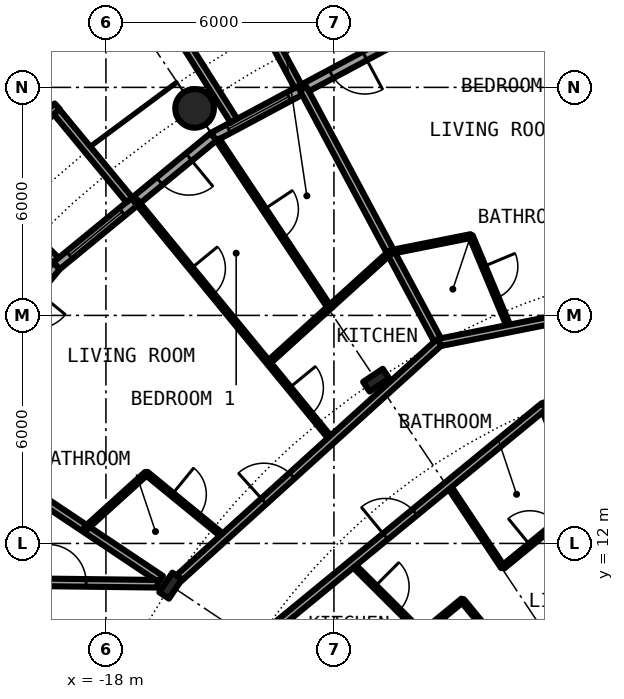
"""IFC4 building model, lengths in metres.
Left out: names, types, materials, properties, quantities, classifications, styles, units other than length and angle.
Written with IfcOpenShell. Run it as: python <this file> out.ifc"""

import sys

from ifc_helpers import new_model, si_unit, direction, frame, frame_2d, origin, origin_2d, place, context, subcontext, project, spatial, rectangle, circle, hollow_circle, i_section, extrude, element, fill, save


model = new_model("IFC4")
c1 = context("Model", 3, precision=1e-05, world=origin(), true_north=direction((0.0, 1.0)))
c2 = subcontext(c1, "Body", "Model", "MODEL_VIEW")
j1 = project(units=[si_unit("LENGTHUNIT", "METRE"), si_unit("PLANEANGLEUNIT", "RADIAN")], contexts=[c1])
p1 = place(None, origin())
s1 = spatial("IfcSite", under=j1, at=p1, CompositionType="ELEMENT")
p2 = place(p1, origin())
s2 = spatial("IfcBuilding", under=s1, at=p2, CompositionType="ELEMENT")
p3 = place(p2, frame((0.0, 0.0, 35.0)))
s3 = spatial("IfcBuildingStorey", under=s2, at=p3, CompositionType="ELEMENT", Elevation=35.0)
p4 = place(p3, frame((-15.667, 23.448, 0.0), z_axis=(0.0, 0.0, 1.0), x_axis=(1.0, 0.0, 0.0)))
e1 = element("IfcColumn", 1, at=p4, inside=s3, PredefinedType="COLUMN", context=c2, shape_type="SweptSolid", body=[
    extrude(hollow_circle(Radius=0.508, WallThickness=0.05, at=origin_2d()), origin(), (0.0, 0.0, 1.0), 3.05),
])
for number, where, z_axis, x_axis in (
    (2, (-10.889, 16.297, 0.0), (0.0, 0.0, 1.0), (-0.556, 0.831, 0.0)),
    (3, (-16.297, 10.889, 0.0), (0.0, 0.0, 1.0), (-0.831, 0.556, 0.0)),
):
    element("IfcColumn", number, at=place(p3, frame(where, z_axis=z_axis, x_axis=x_axis)), inside=s3, PredefinedType="COLUMN", context=c2, shape_type="SweptSolid", body=[
        extrude(i_section(OverallWidth=0.305, OverallDepth=0.62, WebThickness=0.021, FlangeThickness=0.04, FilletRadius=0.027, at=origin_2d()), origin(), (0.0, 0.0, 1.0), 3.05),
    ])
p5 = place(p3, frame((-10.447, 25.222, 0.0), z_axis=(0.0, 0.0, 1.0), x_axis=(-0.881915646801, -0.471407246368, 0.0)))
e4 = element("IfcWall", 4, at=p5, inside=s3, PredefinedType="SOLIDWALL", context=c2, shape_type="SweptSolid", body=[
    extrude(rectangle(XDim=5.352, YDim=0.25, at=frame_2d((2.676, 0.0))), origin(), (0.0, 0.0, 1.0), 2.7),
])
p6 = place(p5, frame((0.841, 0.0, 0.0)))
e5 = element("IfcOpeningElement", 5, at=p6, cuts=e4, PredefinedType="OPENING", context=c2, shape_type="SweptSolid", body=[
    extrude(rectangle(XDim=1.0, YDim=2.2, at=frame_2d((0.5, 1.1))), frame((0.0, 0.135, 0.0), z_axis=(0.0, -1.0, 0.0), x_axis=(1.0, 0.0, 0.0)), (0.0, 0.0, 1.0), 0.27),
])
p7 = place(p5, frame((3.111, 0.0, 0.3)))
e6 = element("IfcOpeningElement", 6, at=p7, cuts=e4, PredefinedType="OPENING", context=c2, shape_type="SweptSolid", body=[
    extrude(rectangle(XDim=1.8, YDim=2.1, at=frame_2d((0.9, 1.05))), frame((0.0, 0.135, 0.0), z_axis=(0.0, -1.0, 0.0), x_axis=(1.0, 0.0, 0.0)), (0.0, 0.0, 1.0), 0.27),
])
p8 = place(p3, frame((-12.945, 24.029, -0.03), z_axis=(0.0, 0.0, 1.0), x_axis=(-0.474424310775, 0.88029629861, 0.0)))
e7 = element("IfcWall", 7, at=p8, inside=s3, PredefinedType="SOLIDWALL", context=c2, shape_type="SweptSolid", body=[
    extrude(rectangle(XDim=3.006, YDim=0.2, at=frame_2d((1.503, 0.0))), origin(), (0.0, 0.0, 1.0), 2.73),
])
p9 = place(p3, frame((-14.635, 23.126, -0.03), z_axis=(0.0, 0.0, 1.0), x_axis=(-0.534437802731, 0.845207805816, 0.0)))
e8 = element("IfcWall", 8, at=p9, inside=s3, PredefinedType="SOLIDWALL", context=c2, shape_type="SweptSolid", body=[
    extrude(rectangle(XDim=2.932, YDim=0.2, at=frame_2d((1.466, 0.0))), origin(), (0.0, 0.0, 1.0), 2.73),
])
p10 = place(p3, frame((-15.167, 22.699, 0.0), z_axis=(0.0, 0.0, 1.0), x_axis=(-0.773019449054, -0.634382322723, 0.0)))
e9 = element("IfcWall", 9, at=p10, inside=s3, PredefinedType="SOLIDWALL", context=c2, shape_type="SweptSolid", body=[
    extrude(rectangle(XDim=5.352, YDim=0.25, at=frame_2d((2.676, 0.0))), origin(), (0.0, 0.0, 1.0), 2.7),
])
p11 = place(p10, frame((0.841, 0.0, 0.0)))
e10 = element("IfcOpeningElement", 10, at=p11, cuts=e9, PredefinedType="OPENING", context=c2, shape_type="SweptSolid", body=[
    extrude(rectangle(XDim=1.0, YDim=2.2, at=frame_2d((0.5, 1.1))), frame((0.0, 0.135, 0.0), z_axis=(0.0, -1.0, 0.0), x_axis=(1.0, 0.0, 0.0)), (0.0, 0.0, 1.0), 0.27),
])
p12 = place(p10, frame((3.111, 0.0, 0.3)))
e11 = element("IfcOpeningElement", 11, at=p12, cuts=e9, PredefinedType="OPENING", context=c2, shape_type="SweptSolid", body=[
    extrude(rectangle(XDim=1.8, YDim=2.1, at=frame_2d((0.9, 1.05))), frame((0.0, 0.135, 0.0), z_axis=(0.0, -1.0, 0.0), x_axis=(1.0, 0.0, 0.0)), (0.0, 0.0, 1.0), 0.27),
])
p13 = place(p3, frame((-19.282, 23.503, -0.03), z_axis=(0.0, 0.0, 1.0), x_axis=(-0.740998365753, -0.671506829416, 0.0)))
e12 = element("IfcWall", 12, at=p13, inside=s3, PredefinedType="SOLIDWALL", context=c2, shape_type="SweptSolid", body=[
    extrude(rectangle(XDim=2.993, YDim=0.2, at=frame_2d((1.497, 0.0))), origin(), (0.0, 0.0, 1.0), 2.73),
])
p14 = place(p13, frame((0.457, 0.0, 0.33)))
e13 = element("IfcOpeningElement", 13, at=p14, cuts=e12, PredefinedType="OPENING", context=c2, shape_type="SweptSolid", body=[
    extrude(circle(Radius=1.04, at=frame_2d((1.04, 1.04))), frame((0.0, 0.11, 0.0), z_axis=(0.0, -1.0, 0.0), x_axis=(1.0, 0.0, 0.0)), (0.0, 0.0, 1.0), 0.22),
])
p15 = place(p3, frame((-17.384, 21.041, -0.03), z_axis=(0.0, 0.0, 1.0), x_axis=(-0.63709551667, 0.770784861449, 0.0)))
e14 = element("IfcWall", 14, at=p15, inside=s3, PredefinedType="SOLIDWALL", context=c2, shape_type="SweptSolid", body=[
    extrude(rectangle(XDim=3.006, YDim=0.2, at=frame_2d((1.503, 0.0))), origin(), (0.0, 0.0, 1.0), 2.73),
])
p16 = place(p3, frame((-19.323, 19.45, -0.03), z_axis=(0.0, 0.0, 1.0), x_axis=(-0.704476739375, 0.709727076896, 0.0)))
e15 = element("IfcWall", 15, at=p16, inside=s3, PredefinedType="SOLIDWALL", context=c2, shape_type="SweptSolid", body=[
    extrude(rectangle(XDim=2.883, YDim=0.2, at=frame_2d((1.441, 0.0))), origin(), (0.0, 0.0, 1.0), 2.73),
])
p17 = place(p3, frame((-19.304, 19.304, 0.0), z_axis=(0.0, 0.0, 1.0), x_axis=(-0.634382322723, -0.773019449054, 0.0)))
e16 = element("IfcWall", 16, at=p17, inside=s3, PredefinedType="SOLIDWALL", context=c2, shape_type="SweptSolid", body=[
    extrude(rectangle(XDim=5.352, YDim=0.25, at=frame_2d((2.676, 0.0))), origin(), (0.0, 0.0, 1.0), 2.7),
])
p18 = place(p17, frame((0.841, 0.0, 0.0)))
e17 = element("IfcOpeningElement", 17, at=p18, cuts=e16, PredefinedType="OPENING", context=c2, shape_type="SweptSolid", body=[
    extrude(rectangle(XDim=1.0, YDim=2.2, at=frame_2d((0.5, 1.1))), frame((0.0, 0.135, 0.0), z_axis=(0.0, -1.0, 0.0), x_axis=(1.0, 0.0, 0.0)), (0.0, 0.0, 1.0), 0.27),
])
p19 = place(p17, frame((3.111, 0.0, 0.3)))
e18 = element("IfcOpeningElement", 18, at=p19, cuts=e16, PredefinedType="OPENING", context=c2, shape_type="SweptSolid", body=[
    extrude(rectangle(XDim=1.8, YDim=2.1, at=frame_2d((0.9, 1.05))), frame((0.0, 0.135, 0.0), z_axis=(0.0, -1.0, 0.0), x_axis=(1.0, 0.0, 0.0)), (0.0, 0.0, 1.0), 0.27),
])
p20 = place(p3, frame((-22.595, 15.098, 0.0), z_axis=(0.0, 0.0, 1.0), x_axis=(0.831403467378, -0.55566921314, 0.0)))
e19 = element("IfcWall", 19, at=p20, inside=s3, PredefinedType="PARTITIONING", context=c2, shape_type="SweptSolid", body=[
    extrude(rectangle(XDim=7.265, YDim=0.2, at=frame_2d((3.632, 0.0))), origin(), (0.0, 0.0, 1.0), 2.7),
])
p21 = place(p3, frame((-17.219, 21.023, 0.0), z_axis=(0.0, 0.0, 1.0), x_axis=(0.633664062855, -0.773608334654, 0.0)))
e20 = element("IfcWall", 20, at=p21, inside=s3, PredefinedType="PARTITIONING", context=c2, shape_type="SweptSolid", body=[
    extrude(rectangle(XDim=8.138, YDim=0.1, at=frame_2d((4.069, 0.0))), origin(), (0.0, 0.0, 1.0), 2.7),
])
p22 = place(p21, frame((6.377, 0.0, 0.0)))
e21 = element("IfcOpeningElement", 21, at=p22, cuts=e20, PredefinedType="OPENING", context=c2, shape_type="SweptSolid", body=[
    extrude(rectangle(XDim=0.9, YDim=2.3, at=frame_2d((0.45, 1.15))), frame((0.0, 0.06, 0.0), z_axis=(0.0, -1.0, 0.0), x_axis=(1.0, 0.0, 0.0)), (0.0, 0.0, 1.0), 0.12),
])
p23 = place(p21, frame((2.308, 0.0, 0.0)))
e22 = element("IfcOpeningElement", 22, at=p23, cuts=e20, PredefinedType="OPENING", context=c2, shape_type="SweptSolid", body=[
    extrude(rectangle(XDim=0.9, YDim=2.3, at=frame_2d((0.45, 1.15))), frame((0.0, 0.06, 0.0), z_axis=(0.0, -1.0, 0.0), x_axis=(1.0, 0.0, 0.0)), (0.0, 0.0, 1.0), 0.12),
])
p24 = place(p3, frame((-16.936, 13.845, 0.0), z_axis=(0.0, 0.0, 1.0), x_axis=(0.774162545943, -0.632986850147, 0.0)))
e23 = element("IfcWall", 23, at=p24, inside=s3, PredefinedType="PARTITIONING", context=c2, shape_type="SweptSolid", body=[
    extrude(rectangle(XDim=2.649, YDim=0.1, at=frame_2d((1.325, 0.0))), origin(), (0.0, 0.0, 1.0), 2.7),
])
p25 = place(p24, frame((0.875, 0.0, 0.0)))
e24 = element("IfcOpeningElement", 24, at=p25, cuts=e23, PredefinedType="OPENING", context=c2, shape_type="SweptSolid", body=[
    extrude(rectangle(XDim=0.9, YDim=2.3, at=frame_2d((0.45, 1.15))), frame((0.0, 0.06, 0.0), z_axis=(0.0, -1.0, 0.0), x_axis=(1.0, 0.0, 0.0)), (0.0, 0.0, 1.0), 0.12),
])
p26 = place(p3, frame((-15.054, 22.624, 0.0), z_axis=(0.0, 0.0, 1.0), x_axis=(0.553913391217, -0.832574294, 0.0)))
e25 = element("IfcWall", 25, at=p26, inside=s3, PredefinedType="PARTITIONING", context=c2, shape_type="SweptSolid", body=[
    extrude(rectangle(XDim=5.301, YDim=0.1, at=frame_2d((2.65, 0.0))), origin(), (0.0, 0.0, 1.0), 2.7),
])
p27 = place(p26, frame((2.2, 0.0, 0.0)))
e26 = element("IfcOpeningElement", 26, at=p27, cuts=e25, PredefinedType="OPENING", context=c2, shape_type="SweptSolid", body=[
    extrude(rectangle(XDim=0.9, YDim=2.3, at=frame_2d((0.45, 1.15))), frame((0.0, 0.06, 0.0), z_axis=(0.0, -1.0, 0.0), x_axis=(1.0, 0.0, 0.0)), (0.0, 0.0, 1.0), 0.12),
])
p28 = place(p3, frame((-12.81, 23.966, 0.0), z_axis=(0.0, 0.0, 1.0), x_axis=(0.471439510802, -0.881898399848, 0.0)))
e27 = element("IfcWall", 27, at=p28, inside=s3, PredefinedType="PARTITIONING", context=c2, shape_type="SweptSolid", body=[
    extrude(rectangle(XDim=7.575, YDim=0.2, at=frame_2d((3.787, 0.0))), origin(), (0.0, 0.0, 1.0), 2.7),
])
p29 = place(p3, frame((-11.524, 11.464, 0.0), z_axis=(0.0, 0.0, 1.0), x_axis=(0.708796844581, -0.705412668665, 0.0)))
e28 = element("IfcWall", 28, at=p29, inside=s3, PredefinedType="PARTITIONING", context=c2, shape_type="SweptSolid", body=[
    extrude(rectangle(XDim=2.597, YDim=0.1, at=frame_2d((1.299, 0.0))), origin(), (0.0, 0.0, 1.0), 2.7),
])
p30 = place(p29, frame((0.849, 0.0, 0.0)))
e29 = element("IfcOpeningElement", 29, at=p30, cuts=e28, PredefinedType="OPENING", context=c2, shape_type="SweptSolid", body=[
    extrude(rectangle(XDim=0.9, YDim=2.3, at=frame_2d((0.45, 1.15))), frame((0.0, 0.06, 0.0), z_axis=(0.0, -1.0, 0.0), x_axis=(1.0, 0.0, 0.0)), (0.0, 0.0, 1.0), 0.12),
])
p31 = place(p3, frame((-8.996, 13.539, 0.0), z_axis=(0.0, 0.0, 1.0), x_axis=(0.553615197403, -0.83277260594, 0.0)))
e30 = element("IfcWall", 30, at=p31, inside=s3, PredefinedType="PARTITIONING", context=c2, shape_type="SweptSolid", body=[
    extrude(rectangle(XDim=2.597, YDim=0.1, at=frame_2d((1.299, 0.0))), origin(), (0.0, 0.0, 1.0), 2.7),
])
p32 = place(p3, frame((-8.621, 10.503, 0.0), z_axis=(0.0, 0.0, 1.0), x_axis=(0.634358693064, -0.773038840249, 0.0)))
e31 = element("IfcWall", 31, at=p32, inside=s3, PredefinedType="PARTITIONING", context=c2, shape_type="SweptSolid", body=[
    extrude(rectangle(XDim=5.868, YDim=0.1, at=frame_2d((2.934, 0.0))), origin(), (0.0, 0.0, 1.0), 2.7),
])
p33 = place(p32, frame((2.484, 0.0, 0.0)))
e32 = element("IfcOpeningElement", 32, at=p33, cuts=e31, PredefinedType="OPENING", context=c2, shape_type="SweptSolid", body=[
    extrude(rectangle(XDim=0.9, YDim=2.3, at=frame_2d((0.45, 1.15))), frame((0.0, 0.06, 0.0), z_axis=(0.0, -1.0, 0.0), x_axis=(1.0, 0.0, 0.0)), (0.0, 0.0, 1.0), 0.12),
])
p34 = place(p3, frame((-8.396, 20.088, 0.0), z_axis=(0.0, 0.0, 1.0), x_axis=(0.385844829344, -0.922563693014, 0.0)))
e33 = element("IfcWall", 33, at=p34, inside=s3, PredefinedType="PARTITIONING", context=c2, shape_type="SweptSolid", body=[
    extrude(rectangle(XDim=2.636, YDim=0.1, at=frame_2d((1.318, 0.0))), origin(), (0.0, 0.0, 1.0), 2.7),
])
p35 = place(p34, frame((0.868, 0.0, 0.0)))
e34 = element("IfcOpeningElement", 34, at=p35, cuts=e33, PredefinedType="OPENING", context=c2, shape_type="SweptSolid", body=[
    extrude(rectangle(XDim=0.9, YDim=2.3, at=frame_2d((0.45, 1.15))), frame((0.0, 0.06, 0.0), z_axis=(0.0, -1.0, 0.0), x_axis=(1.0, 0.0, 0.0)), (0.0, 0.0, 1.0), 0.12),
])
p36 = place(p3, frame((-6.467, 15.614, 0.0), z_axis=(0.0, 0.0, 1.0), x_axis=(0.382556139466, -0.923932248683, 0.0)))
e35 = element("IfcWall", 35, at=p36, inside=s3, PredefinedType="PARTITIONING", context=c2, shape_type="SweptSolid", body=[
    extrude(rectangle(XDim=9.18, YDim=0.2, at=frame_2d((4.59, 0.0))), origin(), (0.0, 0.0, 1.0), 2.7),
])
p37 = place(p3, frame((-21.675, 11.0, 0.0), z_axis=(0.0, 0.0, 1.0), x_axis=(0.999926652916, -0.012111514691, 0.0)))
e36 = element("IfcWall", 36, at=p37, inside=s3, PredefinedType="PARTITIONING", context=c2, shape_type="SweptSolid", body=[
    extrude(rectangle(XDim=5.04, YDim=0.2, at=frame_2d((2.52, 0.0))), origin(), (0.0, 0.0, 1.0), 2.7),
])
p38 = place(p37, frame((2.154, 0.0, 0.0)))
e37 = element("IfcOpeningElement", 37, at=p38, cuts=e36, PredefinedType="OPENING", context=c2, shape_type="SweptSolid", body=[
    extrude(rectangle(XDim=1.0, YDim=2.3, at=frame_2d((0.5, 1.15))), frame((0.0, 0.11, 0.0), z_axis=(0.0, -1.0, 0.0), x_axis=(1.0, 0.0, 0.0)), (0.0, 0.0, 1.0), 0.22),
])
p39 = place(p3, frame((-9.965, 9.4, 0.0), z_axis=(0.0, 0.0, 1.0), x_axis=(0.773141825369, 0.634233173104, 0.0)))
e38 = element("IfcWall", 38, at=p39, inside=s3, PredefinedType="PARTITIONING", context=c2, shape_type="SweptSolid", body=[
    extrude(rectangle(XDim=1.749, YDim=0.1, at=frame_2d((0.875, 0.0))), origin(), (0.0, 0.0, 1.0), 2.7),
])
p40 = place(p3, frame((-7.552, 11.379, 0.0), z_axis=(0.0, 0.0, 1.0), x_axis=(0.773323547924, 0.634011585246, 0.0)))
e39 = element("IfcWall", 39, at=p40, inside=s3, PredefinedType="PARTITIONING", context=c2, shape_type="SweptSolid", body=[
    extrude(rectangle(XDim=2.748, YDim=0.1, at=frame_2d((1.374, 0.0))), origin(), (0.0, 0.0, 1.0), 2.7),
])
p41 = place(p40, frame((0.917, 0.0, 0.0)))
e40 = element("IfcOpeningElement", 40, at=p41, cuts=e39, PredefinedType="OPENING", context=c2, shape_type="SweptSolid", body=[
    extrude(rectangle(XDim=0.9, YDim=2.3, at=frame_2d((0.45, 1.15))), frame((0.0, 0.06, 0.0), z_axis=(0.0, -1.0, 0.0), x_axis=(1.0, 0.0, 0.0)), (0.0, 0.0, 1.0), 0.12),
])
p42 = place(p3, frame((-14.039, 9.4, 0.0), z_axis=(0.0, 0.0, 1.0), x_axis=(0.77298340166, 0.634426245326, 0.0)))
e41 = element("IfcWall", 41, at=p42, inside=s3, PredefinedType="PARTITIONING", context=c2, shape_type="SweptSolid", body=[
    extrude(rectangle(XDim=9.793, YDim=0.2, at=frame_2d((4.896, 0.0))), origin(), (0.0, 0.0, 1.0), 2.7),
])
p43 = place(p42, frame((4.389, 0.0, 0.0)))
e42 = element("IfcOpeningElement", 42, at=p43, cuts=e41, PredefinedType="OPENING", context=c2, shape_type="SweptSolid", body=[
    extrude(rectangle(XDim=1.0, YDim=2.3, at=frame_2d((0.5, 1.15))), frame((0.0, 0.11, 0.0), z_axis=(0.0, -1.0, 0.0), x_axis=(1.0, 0.0, 0.0)), (0.0, 0.0, 1.0), 0.22),
])
p44 = place(p3, frame((-9.239, 17.286, 0.0), z_axis=(0.0, 0.0, 1.0), x_axis=(0.98077905287, 0.195121627328, 0.0)))
e43 = element("IfcWall", 43, at=p44, inside=s3, PredefinedType="PARTITIONING", context=c2, shape_type="SweptSolid", body=[
    extrude(rectangle(XDim=11.379, YDim=0.2, at=frame_2d((5.689, 0.0))), origin(), (0.0, 0.0, 1.0), 2.38),
])
p45 = place(p44, frame((3.293, 0.0, 0.0)))
e44 = element("IfcOpeningElement", 44, at=p45, cuts=e43, PredefinedType="OPENING", context=c2, shape_type="SweptSolid", body=[
    extrude(rectangle(XDim=1.0, YDim=2.3, at=frame_2d((0.5, 1.15))), frame((0.0, 0.11, 0.0), z_axis=(0.0, -1.0, 0.0), x_axis=(1.0, 0.0, 0.0)), (0.0, 0.0, 1.0), 0.22),
])
p46 = place(p3, frame((-16.18, 10.995, 0.0), z_axis=(0.0, 0.0, 1.0), x_axis=(0.74112906966, 0.671362571272, 0.0)))
e45 = element("IfcWall", 45, at=p46, inside=s3, PredefinedType="PARTITIONING", context=c2, shape_type="SweptSolid", body=[
    extrude(rectangle(XDim=9.375, YDim=0.2, at=frame_2d((4.688, 0.0))), origin(), (0.0, 0.0, 1.0), 2.38),
])
p47 = place(p46, frame((3.152, 0.0, 0.0)))
e46 = element("IfcOpeningElement", 46, at=p47, cuts=e45, PredefinedType="OPENING", context=c2, shape_type="SweptSolid", body=[
    extrude(rectangle(XDim=1.0, YDim=2.3, at=frame_2d((0.5, 1.15))), frame((0.0, 0.11, 0.0), z_axis=(0.0, -1.0, 0.0), x_axis=(1.0, 0.0, 0.0)), (0.0, 0.0, 1.0), 0.22),
])
p48 = place(p3, frame((-10.511, 19.667, 0.0), z_axis=(0.0, 0.0, 1.0), x_axis=(0.980784706341, 0.195093208, 0.0)))
e47 = element("IfcWall", 47, at=p48, inside=s3, PredefinedType="PARTITIONING", context=c2, shape_type="SweptSolid", body=[
    extrude(rectangle(XDim=2.157, YDim=0.1, at=frame_2d((1.079, 0.0))), origin(), (0.0, 0.0, 1.0), 2.7),
])
p49 = place(p3, frame((-18.54, 12.392, 0.0), z_axis=(0.0, 0.0, 1.0), x_axis=(0.741319612235, 0.671152167929, 0.0)))
e48 = element("IfcWall", 48, at=p49, inside=s3, PredefinedType="PARTITIONING", context=c2, shape_type="SweptSolid", body=[
    extrude(rectangle(XDim=2.168, YDim=0.1, at=frame_2d((1.084, 0.0))), origin(), (0.0, 0.0, 1.0), 2.7),
])
p50 = place(p3, frame((-13.727, 16.754, 0.0), z_axis=(0.0, 0.0, 1.0), x_axis=(0.741134692738, 0.671356363804, 0.0)))
e49 = element("IfcWall", 49, at=p50, inside=s3, PredefinedType="PARTITIONING", context=c2, shape_type="SweptSolid", body=[
    extrude(rectangle(XDim=4.342, YDim=0.1, at=frame_2d((2.171, 0.0))), origin(), (0.0, 0.0, 1.0), 2.7),
])
p51 = place(p6, origin())
e50 = element("IfcDoor", 50, at=p51, inside=s3, OperationType="SINGLE_SWING_LEFT", PredefinedType="DOOR", context=c2, shape_type="SweptSolid", body=[
    extrude(rectangle(XDim=1.0, YDim=2.2, at=frame_2d((0.5, 1.1))), frame((0.0, 0.025, 0.0), z_axis=(0.0, -1.0, 0.0), x_axis=(1.0, 0.0, 0.0)), (0.0, 0.0, 1.0), 0.05),
])
fill(e5, e50)
p52 = place(p7, origin())
e51 = element("IfcWindow", 51, at=p52, inside=s3, PartitioningType="SINGLE_PANEL", PredefinedType="WINDOW", context=c2, shape_type="SweptSolid", body=[
    extrude(rectangle(XDim=1.8, YDim=2.1, at=frame_2d((0.9, 1.05))), frame((0.0, 0.03, 0.0), z_axis=(0.0, -1.0, 0.0), x_axis=(1.0, 0.0, 0.0)), (0.0, 0.0, 1.0), 0.06),
])
fill(e6, e51)
p53 = place(p11, origin())
e52 = element("IfcDoor", 52, at=p53, inside=s3, OperationType="SINGLE_SWING_LEFT", PredefinedType="DOOR", context=c2, shape_type="SweptSolid", body=[
    extrude(rectangle(XDim=1.0, YDim=2.2, at=frame_2d((0.5, 1.1))), frame((0.0, 0.025, 0.0), z_axis=(0.0, -1.0, 0.0), x_axis=(1.0, 0.0, 0.0)), (0.0, 0.0, 1.0), 0.05),
])
fill(e10, e52)
p54 = place(p12, origin())
e53 = element("IfcWindow", 53, at=p54, inside=s3, PartitioningType="SINGLE_PANEL", PredefinedType="WINDOW", context=c2, shape_type="SweptSolid", body=[
    extrude(rectangle(XDim=1.8, YDim=2.1, at=frame_2d((0.9, 1.05))), frame((0.0, 0.03, 0.0), z_axis=(0.0, -1.0, 0.0), x_axis=(1.0, 0.0, 0.0)), (0.0, 0.0, 1.0), 0.06),
])
fill(e11, e53)
p55 = place(p35, origin())
e54 = element("IfcDoor", 54, at=p55, inside=s3, OperationType="SINGLE_SWING_LEFT", PredefinedType="DOOR", context=c2, shape_type="SweptSolid", body=[
    extrude(rectangle(XDim=0.9, YDim=2.3, at=frame_2d((0.45, 1.15))), frame((0.0, 0.025, 0.0), z_axis=(0.0, -1.0, 0.0), x_axis=(1.0, 0.0, 0.0)), (0.0, 0.0, 1.0), 0.05),
])
fill(e34, e54)
p56 = place(p47, origin())
e55 = element("IfcDoor", 55, at=p56, inside=s3, OperationType="SINGLE_SWING_LEFT", PredefinedType="DOOR", context=c2, shape_type="SweptSolid", body=[
    extrude(rectangle(XDim=1.0, YDim=2.3, at=frame_2d((0.5, 1.15))), frame((0.0, 0.025, 0.0), z_axis=(0.0, -1.0, 0.0), x_axis=(1.0, 0.0, 0.0)), (0.0, 0.0, 1.0), 0.05),
])
fill(e46, e55)
p57 = place(p25, origin())
e56 = element("IfcDoor", 56, at=p57, inside=s3, OperationType="SINGLE_SWING_LEFT", PredefinedType="DOOR", context=c2, shape_type="SweptSolid", body=[
    extrude(rectangle(XDim=0.9, YDim=2.3, at=frame_2d((0.45, 1.15))), frame((0.0, 0.025, 0.0), z_axis=(0.0, -1.0, 0.0), x_axis=(1.0, 0.0, 0.0)), (0.0, 0.0, 1.0), 0.05),
])
fill(e24, e56)
p58 = place(p22, origin())
e57 = element("IfcDoor", 57, at=p58, inside=s3, OperationType="SINGLE_SWING_RIGHT", PredefinedType="DOOR", context=c2, shape_type="SweptSolid", body=[
    extrude(rectangle(XDim=0.9, YDim=2.3, at=frame_2d((0.45, 1.15))), frame((0.0, 0.025, 0.0), z_axis=(0.0, -1.0, 0.0), x_axis=(1.0, 0.0, 0.0)), (0.0, 0.0, 1.0), 0.05),
])
fill(e21, e57)
p59 = place(p23, origin())
e58 = element("IfcDoor", 58, at=p59, inside=s3, OperationType="SINGLE_SWING_LEFT", PredefinedType="DOOR", context=c2, shape_type="SweptSolid", body=[
    extrude(rectangle(XDim=0.9, YDim=2.3, at=frame_2d((0.45, 1.15))), frame((0.0, 0.025, 0.0), z_axis=(0.0, -1.0, 0.0), x_axis=(1.0, 0.0, 0.0)), (0.0, 0.0, 1.0), 0.05),
])
fill(e22, e58)
p60 = place(p27, origin())
e59 = element("IfcDoor", 59, at=p60, inside=s3, OperationType="SINGLE_SWING_LEFT", PredefinedType="DOOR", context=c2, shape_type="SweptSolid", body=[
    extrude(rectangle(XDim=0.9, YDim=2.3, at=frame_2d((0.45, 1.15))), frame((0.0, 0.025, 0.0), z_axis=(0.0, -1.0, 0.0), x_axis=(1.0, 0.0, 0.0)), (0.0, 0.0, 1.0), 0.05),
])
fill(e26, e59)
p61 = place(p43, origin())
e60 = element("IfcDoor", 60, at=p61, inside=s3, OperationType="SINGLE_SWING_LEFT", PredefinedType="DOOR", context=c2, shape_type="SweptSolid", body=[
    extrude(rectangle(XDim=1.0, YDim=2.3, at=frame_2d((0.5, 1.15))), frame((0.0, 0.025, 0.0), z_axis=(0.0, -1.0, 0.0), x_axis=(1.0, 0.0, 0.0)), (0.0, 0.0, 1.0), 0.05),
])
fill(e42, e60)
p62 = place(p41, origin())
e61 = element("IfcDoor", 61, at=p62, inside=s3, OperationType="SINGLE_SWING_LEFT", PredefinedType="DOOR", context=c2, shape_type="SweptSolid", body=[
    extrude(rectangle(XDim=0.9, YDim=2.3, at=frame_2d((0.45, 1.15))), frame((0.0, 0.025, 0.0), z_axis=(0.0, -1.0, 0.0), x_axis=(1.0, 0.0, 0.0)), (0.0, 0.0, 1.0), 0.05),
])
fill(e40, e61)
p63 = place(p30, origin())
e62 = element("IfcDoor", 62, at=p63, inside=s3, OperationType="SINGLE_SWING_RIGHT", PredefinedType="DOOR", context=c2, shape_type="SweptSolid", body=[
    extrude(rectangle(XDim=0.9, YDim=2.3, at=frame_2d((0.45, 1.15))), frame((0.0, 0.025, 0.0), z_axis=(0.0, -1.0, 0.0), x_axis=(1.0, 0.0, 0.0)), (0.0, 0.0, 1.0), 0.05),
])
fill(e29, e62)
p64 = place(p38, origin())
e63 = element("IfcDoor", 63, at=p64, inside=s3, OperationType="SINGLE_SWING_RIGHT", PredefinedType="DOOR", context=c2, shape_type="SweptSolid", body=[
    extrude(rectangle(XDim=1.0, YDim=2.3, at=frame_2d((0.5, 1.15))), frame((0.0, 0.025, 0.0), z_axis=(0.0, -1.0, 0.0), x_axis=(1.0, 0.0, 0.0)), (0.0, 0.0, 1.0), 0.05),
])
fill(e37, e63)
save(model, sys.argv[1])
